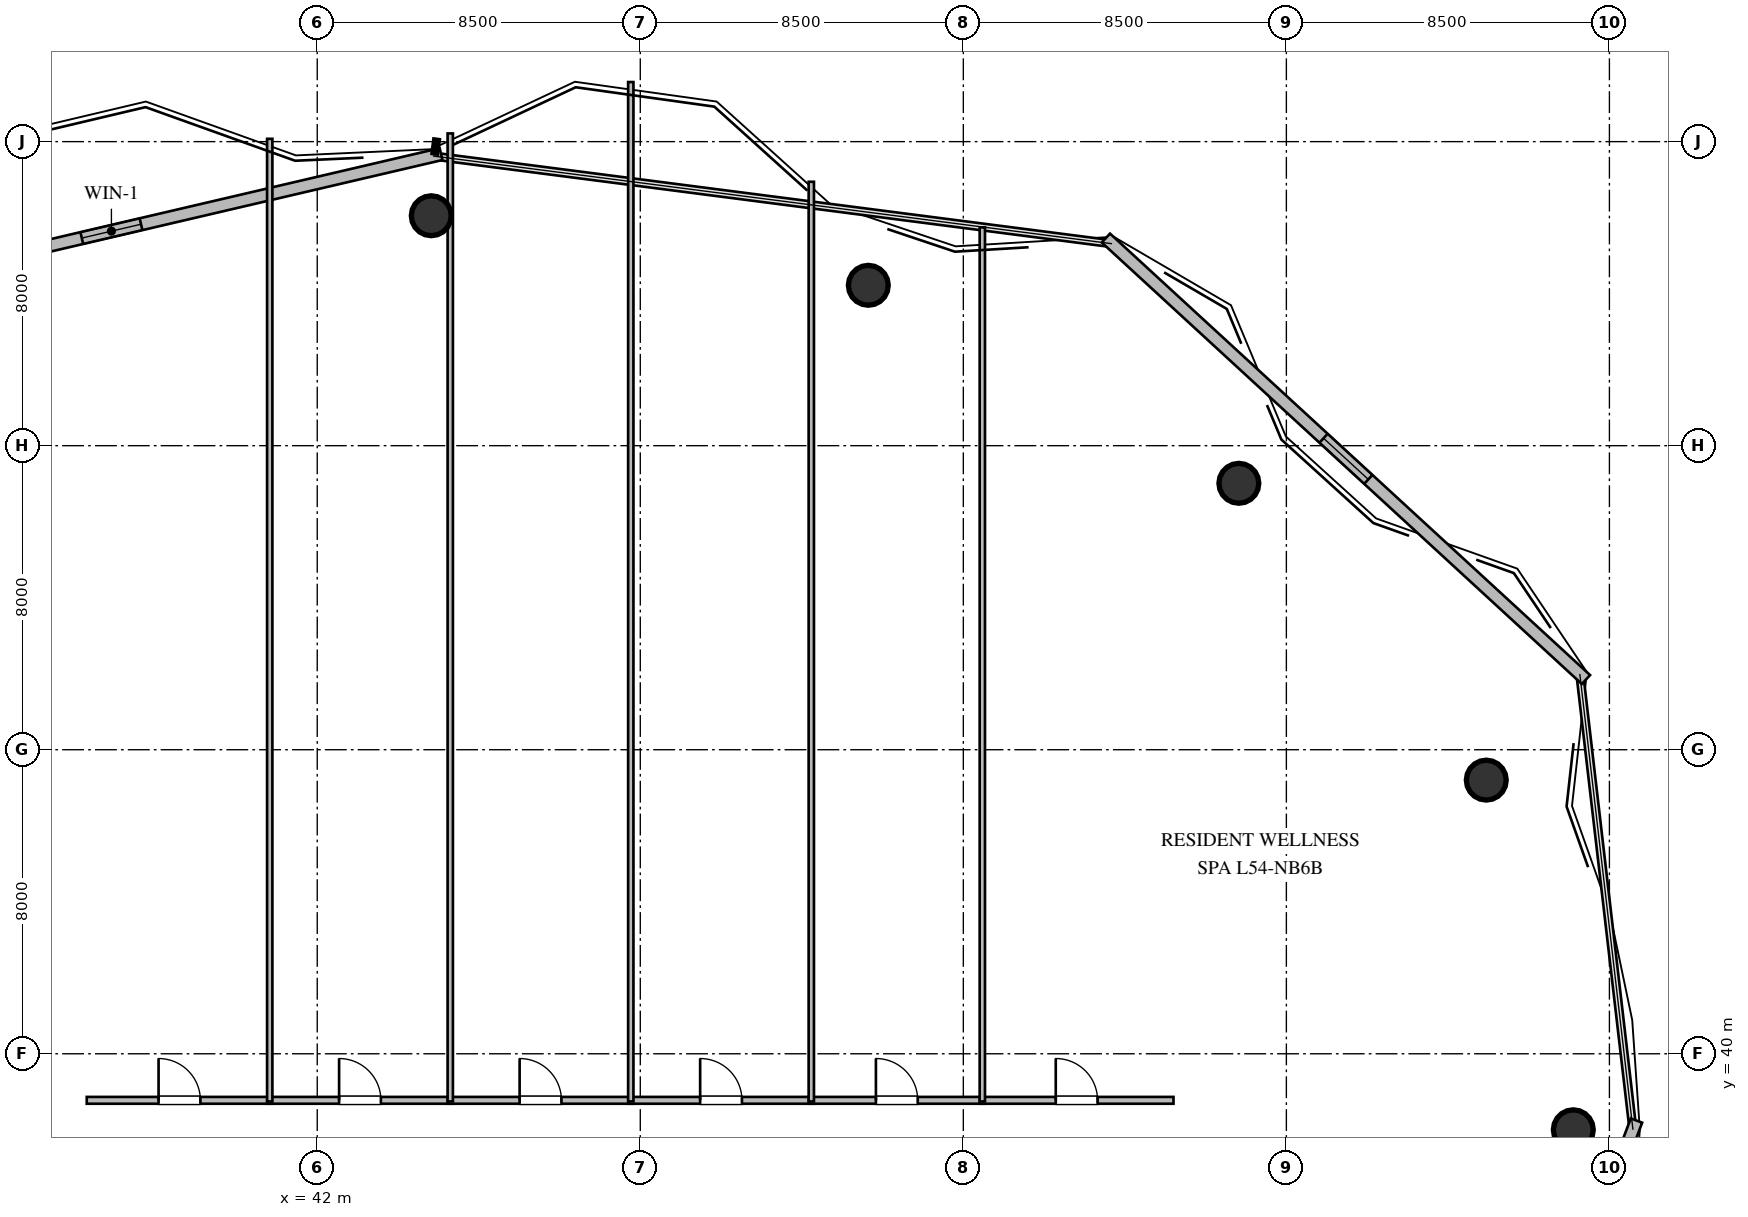
"""IFC4 building model, lengths in metres.
Left out: names, types, materials, properties, quantities, classifications, styles, units other than length and angle.
Written with IfcOpenShell. Run it as: python <this file> out.ifc"""

import sys

from ifc_helpers import new_model, si_unit, direction, frame, frame_2d, origin, origin_2d, place, context, subcontext, project, spatial, rectangle, circle, extrude, element, fill, save


model = new_model("IFC4")
c1 = context("Model", 3, precision=1e-05, world=origin(), true_north=direction((0.0, 1.0)))
c2 = subcontext(c1, "Body", "Model", "MODEL_VIEW")
j1 = project(units=[si_unit("LENGTHUNIT", "METRE"), si_unit("PLANEANGLEUNIT", "RADIAN")], contexts=[c1])
p1 = place(None, origin())
s1 = spatial("IfcSite", under=j1, at=p1, CompositionType="ELEMENT")
p2 = place(p1, origin())
s2 = spatial("IfcBuilding", under=s1, at=p2, CompositionType="ELEMENT")
p3 = place(p2, frame((0.0, 0.0, 206.4)))
s3 = spatial("IfcBuildingStorey", under=s2, at=p3, CompositionType="ELEMENT", Elevation=206.4)
for number, where, z_axis, x_axis in (
    (1, (75.05, 38.0, 0.0), (0.0, 0.0, 1.0), (1.0, 0.0, 0.0)),
    (2, (72.76, 47.2, 0.0), (0.0, 0.0, 1.0), (1.0, 0.0, 0.0)),
    (3, (66.25, 55.01, 0.0), (0.0, 0.0, 1.0), (1.0, 0.0, 0.0)),
    (4, (56.5, 60.22, 0.0), (0.0, 0.0, 1.0), (1.0, 0.0, 0.0)),
    (5, (45.0, 62.05, 0.0), (0.0, 0.0, 1.0), (1.0, 0.0, 0.0)),
):
    element("IfcColumn", number, at=place(p3, frame(where, z_axis=z_axis, x_axis=x_axis)), inside=s3, PredefinedType="COLUMN", context=c2, shape_type="SweptSolid", body=[
        extrude(circle(Radius=0.525, at=origin_2d()), origin(), (0.0, 0.0, 1.0), 3.6),
    ])
p4 = place(p3, frame((76.712, 38.243, 0.0), z_axis=(0.0, 0.0, 1.0), x_axis=(-0.353659523244, -0.935374225441, 0.0)))
e6 = element("IfcWall", 6, at=p4, inside=s3, PredefinedType="STANDARD", context=c2, shape_type="SweptSolid", body=[
    extrude(rectangle(XDim=14.172, YDim=0.32, at=frame_2d((7.086, 0.0))), origin(), (0.0, 0.0, 1.0), 3.36),
])
p5 = place(p3, frame((27.909, 59.617, 0.0), z_axis=(0.0, 0.0, 1.0), x_axis=(0.973753606594, 0.227604731158, 0.0)))
e7 = element("IfcWall", 7, at=p5, inside=s3, PredefinedType="STANDARD", context=c2, shape_type="SweptSolid", body=[
    extrude(rectangle(XDim=17.817, YDim=0.32, at=frame_2d((8.908, 0.0))), origin(), (0.0, 0.0, 1.0), 3.36),
])
p6 = place(p5, frame((8.109, 0.0, 1.05)))
e8 = element("IfcOpeningElement", 8, at=p6, cuts=e7, PredefinedType="OPENING", context=c2, shape_type="SweptSolid", body=[
    extrude(rectangle(XDim=1.6, YDim=1.5, at=frame_2d((0.8, 0.75))), frame((0.0, 0.17, 0.0), z_axis=(0.0, -1.0, 0.0), x_axis=(1.0, 0.0, 0.0)), (0.0, 0.0, 1.0), 0.34),
])
p7 = place(p3, frame((62.751, 61.463, 0.0), z_axis=(0.0, 0.0, 1.0), x_axis=(0.736063690764, -0.676912286149, 0.0)))
e9 = element("IfcWall", 9, at=p7, inside=s3, PredefinedType="STANDARD", context=c2, shape_type="SweptSolid", body=[
    extrude(rectangle(XDim=17.162, YDim=0.32, at=frame_2d((8.581, 0.0))), origin(), (0.0, 0.0, 1.0), 3.36),
])
p8 = place(p7, frame((7.781, 0.0, 1.05)))
e10 = element("IfcOpeningElement", 10, at=p8, cuts=e9, PredefinedType="OPENING", context=c2, shape_type="SweptSolid", body=[
    extrude(rectangle(XDim=1.6, YDim=1.5, at=frame_2d((0.8, 0.75))), frame((0.0, 0.17, 0.0), z_axis=(0.0, -1.0, 0.0), x_axis=(1.0, 0.0, 0.0)), (0.0, 0.0, 1.0), 0.34),
])
p9 = place(p3, frame((35.935, 38.775, 0.0), z_axis=(0.0, 0.0, 1.0), x_axis=(1.0, 0.0, 0.0)))
e11 = element("IfcWall", 11, at=p9, inside=s3, PredefinedType="PARTITIONING", context=c2, shape_type="SweptSolid", body=[
    extrude(rectangle(XDim=4.88, YDim=0.18, at=frame_2d((2.44, 0.0))), origin(), (0.0, 0.0, 1.0), 3.36),
])
p10 = place(p9, frame((1.89, 0.0, 0.0)))
e12 = element("IfcOpeningElement", 12, at=p10, cuts=e11, PredefinedType="OPENING", context=c2, shape_type="SweptSolid", body=[
    extrude(rectangle(XDim=1.1, YDim=2.1, at=frame_2d((0.55, 1.05))), frame((0.0, 0.1, 0.0), z_axis=(0.0, -1.0, 0.0), x_axis=(1.0, 0.0, 0.0)), (0.0, 0.0, 1.0), 0.2),
])
p11 = place(p3, frame((40.685, 38.775, 0.0), z_axis=(0.0, 0.0, 1.0), x_axis=(1.0, 0.0, 0.0)))
e13 = element("IfcWall", 13, at=p11, inside=s3, PredefinedType="PARTITIONING", context=c2, shape_type="SweptSolid", body=[
    extrude(rectangle(XDim=4.88, YDim=0.18, at=frame_2d((2.44, 0.0))), origin(), (0.0, 0.0, 1.0), 3.36),
])
p12 = place(p11, frame((1.89, 0.0, 0.0)))
e14 = element("IfcOpeningElement", 14, at=p12, cuts=e13, PredefinedType="OPENING", context=c2, shape_type="SweptSolid", body=[
    extrude(rectangle(XDim=1.1, YDim=2.1, at=frame_2d((0.55, 1.05))), frame((0.0, 0.1, 0.0), z_axis=(0.0, -1.0, 0.0), x_axis=(1.0, 0.0, 0.0)), (0.0, 0.0, 1.0), 0.2),
])
p13 = place(p3, frame((45.435, 38.775, 0.0), z_axis=(0.0, 0.0, 1.0), x_axis=(1.0, 0.0, 0.0)))
e15 = element("IfcWall", 15, at=p13, inside=s3, PredefinedType="PARTITIONING", context=c2, shape_type="SweptSolid", body=[
    extrude(rectangle(XDim=4.88, YDim=0.18, at=frame_2d((2.44, 0.0))), origin(), (0.0, 0.0, 1.0), 3.36),
])
p14 = place(p13, frame((1.89, 0.0, 0.0)))
e16 = element("IfcOpeningElement", 16, at=p14, cuts=e15, PredefinedType="OPENING", context=c2, shape_type="SweptSolid", body=[
    extrude(rectangle(XDim=1.1, YDim=2.1, at=frame_2d((0.55, 1.05))), frame((0.0, 0.1, 0.0), z_axis=(0.0, -1.0, 0.0), x_axis=(1.0, 0.0, 0.0)), (0.0, 0.0, 1.0), 0.2),
])
p15 = place(p3, frame((50.185, 38.775, 0.0), z_axis=(0.0, 0.0, 1.0), x_axis=(1.0, 0.0, 0.0)))
e17 = element("IfcWall", 17, at=p15, inside=s3, PredefinedType="PARTITIONING", context=c2, shape_type="SweptSolid", body=[
    extrude(rectangle(XDim=4.88, YDim=0.18, at=frame_2d((2.44, 0.0))), origin(), (0.0, 0.0, 1.0), 3.36),
])
p16 = place(p15, frame((1.89, 0.0, 0.0)))
e18 = element("IfcOpeningElement", 18, at=p16, cuts=e17, PredefinedType="OPENING", context=c2, shape_type="SweptSolid", body=[
    extrude(rectangle(XDim=1.1, YDim=2.1, at=frame_2d((0.55, 1.05))), frame((0.0, 0.1, 0.0), z_axis=(0.0, -1.0, 0.0), x_axis=(1.0, 0.0, 0.0)), (0.0, 0.0, 1.0), 0.2),
])
p17 = place(p3, frame((54.935, 38.775, 0.0), z_axis=(0.0, 0.0, 1.0), x_axis=(1.0, 0.0, 0.0)))
e19 = element("IfcWall", 19, at=p17, inside=s3, PredefinedType="PARTITIONING", context=c2, shape_type="SweptSolid", body=[
    extrude(rectangle(XDim=4.63, YDim=0.18, at=frame_2d((2.315, 0.0))), origin(), (0.0, 0.0, 1.0), 3.36),
])
p18 = place(p17, frame((1.765, 0.0, 0.0)))
e20 = element("IfcOpeningElement", 20, at=p18, cuts=e19, PredefinedType="OPENING", context=c2, shape_type="SweptSolid", body=[
    extrude(rectangle(XDim=1.1, YDim=2.1, at=frame_2d((0.55, 1.05))), frame((0.0, 0.1, 0.0), z_axis=(0.0, -1.0, 0.0), x_axis=(1.0, 0.0, 0.0)), (0.0, 0.0, 1.0), 0.2),
])
p19 = place(p3, frame((59.435, 38.775, 0.0), z_axis=(0.0, 0.0, 1.0), x_axis=(1.0, 0.0, 0.0)))
e21 = element("IfcWall", 21, at=p19, inside=s3, PredefinedType="PARTITIONING", context=c2, shape_type="SweptSolid", body=[
    extrude(rectangle(XDim=5.095, YDim=0.18, at=frame_2d((2.547, 0.0))), origin(), (0.0, 0.0, 1.0), 3.36),
])
p20 = place(p19, frame((1.997, 0.0, 0.0)))
e22 = element("IfcOpeningElement", 22, at=p20, cuts=e21, PredefinedType="OPENING", context=c2, shape_type="SweptSolid", body=[
    extrude(rectangle(XDim=1.1, YDim=2.1, at=frame_2d((0.55, 1.05))), frame((0.0, 0.1, 0.0), z_axis=(0.0, -1.0, 0.0), x_axis=(1.0, 0.0, 0.0)), (0.0, 0.0, 1.0), 0.2),
])
p21 = place(p3, frame((40.75, 64.074, 0.0), z_axis=(0.0, 0.0, 1.0), x_axis=(0.0, -1.0, 0.0)))
e23 = element("IfcWall", 23, at=p21, inside=s3, PredefinedType="PARTITIONING", context=c2, shape_type="SweptSolid", body=[
    extrude(rectangle(XDim=25.329, YDim=0.14, at=frame_2d((12.665, 0.0))), origin(), (0.0, 0.0, 1.0), 3.36),
])
p22 = place(p3, frame((45.5, 64.216, 0.0), z_axis=(0.0, 0.0, 1.0), x_axis=(0.0, -1.0, 0.0)))
e24 = element("IfcWall", 24, at=p22, inside=s3, PredefinedType="PARTITIONING", context=c2, shape_type="SweptSolid", body=[
    extrude(rectangle(XDim=25.471, YDim=0.14, at=frame_2d((12.735, 0.0))), origin(), (0.0, 0.0, 1.0), 2.806),
])
p23 = place(p3, frame((50.25, 65.568, 0.0), z_axis=(0.0, 0.0, 1.0), x_axis=(0.0, -1.0, 0.0)))
e25 = element("IfcWall", 25, at=p23, inside=s3, PredefinedType="PARTITIONING", context=c2, shape_type="SweptSolid", body=[
    extrude(rectangle(XDim=26.823, YDim=0.14, at=frame_2d((13.412, 0.0))), origin(), (0.0, 0.0, 1.0), 3.36),
])
p24 = place(p3, frame((55.0, 62.944, 0.0), z_axis=(0.0, 0.0, 1.0), x_axis=(0.0, -1.0, 0.0)))
e26 = element("IfcWall", 26, at=p24, inside=s3, PredefinedType="PARTITIONING", context=c2, shape_type="SweptSolid", body=[
    extrude(rectangle(XDim=24.199, YDim=0.14, at=frame_2d((12.1, 0.0))), origin(), (0.0, 0.0, 1.0), 3.36),
])
p25 = place(p3, frame((59.5, 61.745, 0.0), z_axis=(0.0, 0.0, 1.0), x_axis=(0.0, -1.0, 0.0)))
e27 = element("IfcWall", 27, at=p25, inside=s3, PredefinedType="PARTITIONING", context=c2, shape_type="SweptSolid", body=[
    extrude(rectangle(XDim=23.0, YDim=0.14, at=frame_2d((11.5, 0.0))), origin(), (0.0, 0.0, 1.0), 2.996),
])
p26 = place(p6, origin())
e28 = element("IfcWindow", 28, at=p26, inside=s3, PartitioningType="SINGLE_PANEL", PredefinedType="WINDOW", context=c2, shape_type="SweptSolid", body=[
    extrude(rectangle(XDim=1.6, YDim=1.5, at=frame_2d((0.8, 0.75))), frame((0.0, 0.03, 0.0), z_axis=(0.0, -1.0, 0.0), x_axis=(1.0, 0.0, 0.0)), (0.0, 0.0, 1.0), 0.06),
])
fill(e8, e28)
p27 = place(p8, origin())
e29 = element("IfcWindow", 29, at=p27, inside=s3, PartitioningType="SINGLE_PANEL", PredefinedType="WINDOW", context=c2, shape_type="SweptSolid", body=[
    extrude(rectangle(XDim=1.6, YDim=1.5, at=frame_2d((0.8, 0.75))), frame((0.0, 0.03, 0.0), z_axis=(0.0, -1.0, 0.0), x_axis=(1.0, 0.0, 0.0)), (0.0, 0.0, 1.0), 0.06),
])
fill(e10, e29)
p28 = place(p10, origin())
e30 = element("IfcDoor", 30, at=p28, inside=s3, OperationType="SINGLE_SWING_LEFT", PredefinedType="DOOR", context=c2, shape_type="SweptSolid", body=[
    extrude(rectangle(XDim=1.1, YDim=2.1, at=frame_2d((0.55, 1.05))), frame((0.0, 0.025, 0.0), z_axis=(0.0, -1.0, 0.0), x_axis=(1.0, 0.0, 0.0)), (0.0, 0.0, 1.0), 0.05),
])
fill(e12, e30)
p29 = place(p12, origin())
e31 = element("IfcDoor", 31, at=p29, inside=s3, OperationType="SINGLE_SWING_LEFT", PredefinedType="DOOR", context=c2, shape_type="SweptSolid", body=[
    extrude(rectangle(XDim=1.1, YDim=2.1, at=frame_2d((0.55, 1.05))), frame((0.0, 0.025, 0.0), z_axis=(0.0, -1.0, 0.0), x_axis=(1.0, 0.0, 0.0)), (0.0, 0.0, 1.0), 0.05),
])
fill(e14, e31)
p30 = place(p14, origin())
e32 = element("IfcDoor", 32, at=p30, inside=s3, OperationType="SINGLE_SWING_LEFT", PredefinedType="DOOR", context=c2, shape_type="SweptSolid", body=[
    extrude(rectangle(XDim=1.1, YDim=2.1, at=frame_2d((0.55, 1.05))), frame((0.0, 0.025, 0.0), z_axis=(0.0, -1.0, 0.0), x_axis=(1.0, 0.0, 0.0)), (0.0, 0.0, 1.0), 0.05),
])
fill(e16, e32)
p31 = place(p16, origin())
e33 = element("IfcDoor", 33, at=p31, inside=s3, OperationType="SINGLE_SWING_LEFT", PredefinedType="DOOR", context=c2, shape_type="SweptSolid", body=[
    extrude(rectangle(XDim=1.1, YDim=2.1, at=frame_2d((0.55, 1.05))), frame((0.0, 0.025, 0.0), z_axis=(0.0, -1.0, 0.0), x_axis=(1.0, 0.0, 0.0)), (0.0, 0.0, 1.0), 0.05),
])
fill(e18, e33)
p32 = place(p18, origin())
e34 = element("IfcDoor", 34, at=p32, inside=s3, OperationType="SINGLE_SWING_LEFT", PredefinedType="DOOR", context=c2, shape_type="SweptSolid", body=[
    extrude(rectangle(XDim=1.1, YDim=2.1, at=frame_2d((0.55, 1.05))), frame((0.0, 0.025, 0.0), z_axis=(0.0, -1.0, 0.0), x_axis=(1.0, 0.0, 0.0)), (0.0, 0.0, 1.0), 0.05),
])
fill(e20, e34)
p33 = place(p20, origin())
e35 = element("IfcDoor", 35, at=p33, inside=s3, OperationType="SINGLE_SWING_LEFT", PredefinedType="DOOR", context=c2, shape_type="SweptSolid", body=[
    extrude(rectangle(XDim=1.1, YDim=2.1, at=frame_2d((0.55, 1.05))), frame((0.0, 0.025, 0.0), z_axis=(0.0, -1.0, 0.0), x_axis=(1.0, 0.0, 0.0)), (0.0, 0.0, 1.0), 0.05),
])
fill(e22, e35)
save(model, sys.argv[1])
